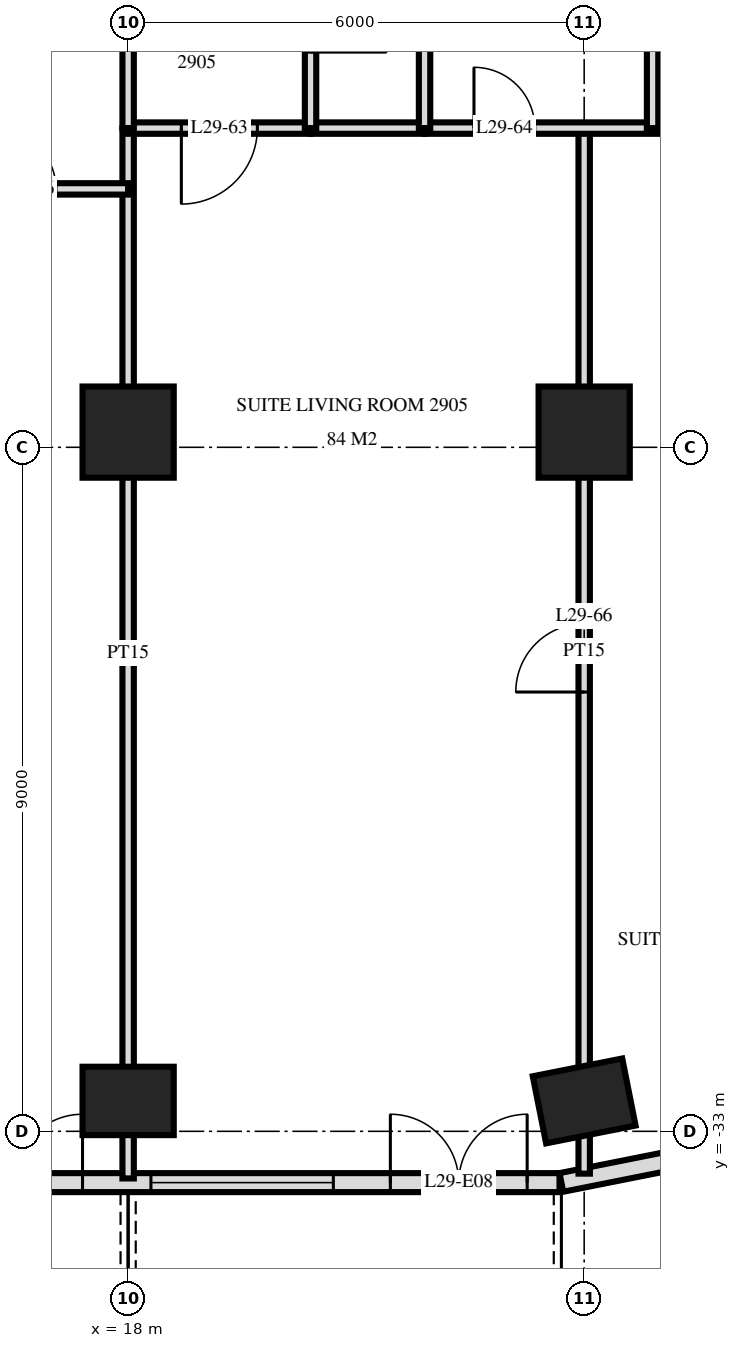
"""IFC4 building model, lengths in metres.
Left out: names, types, materials, properties, quantities, classifications, styles, units other than length and angle.
Written with IfcOpenShell. Run it as: python <this file> out.ifc"""

import sys

from ifc_helpers import new_model, si_unit, direction, frame, frame_2d, origin, origin_2d, place, context, subcontext, project, spatial, rectangle, extrude, element, fill, save


model = new_model("IFC4")
c1 = context("Model", 3, precision=1e-05, world=origin(), true_north=direction((0.0, 1.0)))
c2 = subcontext(c1, "Body", "Model", "MODEL_VIEW")
j1 = project(units=[si_unit("LENGTHUNIT", "METRE"), si_unit("PLANEANGLEUNIT", "RADIAN")], contexts=[c1])
p1 = place(None, origin())
s1 = spatial("IfcSite", under=j1, at=p1, CompositionType="ELEMENT")
p2 = place(p1, origin())
s2 = spatial("IfcBuilding", under=s1, at=p2, CompositionType="ELEMENT")
p3 = place(p2, frame((0.0, 0.0, 116.4)))
s3 = spatial("IfcBuildingStorey", under=s2, at=p3, CompositionType="ELEMENT", Elevation=116.4)
p4 = place(p3, frame((18.0, -32.6, 0.0), z_axis=(0.0, 0.0, 1.0), x_axis=(1.0, 0.0, 0.0)))
e1 = element("IfcColumn", 1, at=p4, inside=s3, PredefinedType="COLUMN", context=c2, shape_type="SweptSolid", body=[
    extrude(rectangle(XDim=1.2, YDim=0.9, at=origin_2d()), origin(), (0.0, 0.0, 1.0), 3.6),
])
p5 = place(p3, frame((18.0, -23.8, 0.0), z_axis=(0.0, 0.0, 1.0), x_axis=(1.0, 0.0, 0.0)))
e2 = element("IfcColumn", 2, at=p5, inside=s3, PredefinedType="COLUMN", context=c2, shape_type="SweptSolid", body=[
    extrude(rectangle(XDim=1.2, YDim=1.2, at=origin_2d()), origin(), (0.0, 0.0, 1.0), 3.6),
])
p6 = place(p3, frame((24.0, -32.6, 0.0), z_axis=(0.0, 0.0, 1.0), x_axis=(0.980792089743, 0.195056086032, 0.0)))
e3 = element("IfcColumn", 3, at=p6, inside=s3, PredefinedType="COLUMN", context=c2, shape_type="SweptSolid", body=[
    extrude(rectangle(XDim=1.2, YDim=0.9, at=origin_2d()), origin(), (0.0, 0.0, 1.0), 3.6),
])
p7 = place(p3, frame((24.0, -23.8, 0.0), z_axis=(0.0, 0.0, 1.0), x_axis=(1.0, 0.0, 0.0)))
e4 = element("IfcColumn", 4, at=p7, inside=s3, PredefinedType="COLUMN", context=c2, shape_type="SweptSolid", body=[
    extrude(rectangle(XDim=1.2, YDim=1.2, at=origin_2d()), origin(), (0.0, 0.0, 1.0), 3.6),
])
p8 = place(p3, frame((-23.675, -33.675, 0.0), z_axis=(0.0, 0.0, 1.0), x_axis=(1.0, 0.0, 0.0)))
e5 = element("IfcWall", 5, at=p8, inside=s3, PredefinedType="SOLIDWALL", context=c2, shape_type="SweptSolid", body=[
    extrude(rectangle(XDim=47.351, YDim=0.25, at=frame_2d((23.675, 0.0))), origin(), (0.0, 0.0, 1.0), 3.32),
])
p9 = place(p8, frame((0.275, 0.0, 0.3)))
e6 = element("IfcOpeningElement", 6, at=p9, cuts=e5, PredefinedType="OPENING", context=c2, shape_type="SweptSolid", body=[
    extrude(rectangle(XDim=2.4, YDim=2.1, at=frame_2d((1.2, 1.05))), frame((0.0, 0.135, 0.0), z_axis=(0.0, -1.0, 0.0), x_axis=(1.0, 0.0, 0.0)), (0.0, 0.0, 1.0), 0.27),
])
p10 = place(p8, frame((3.425, 0.0, 0.0)))
e7 = element("IfcOpeningElement", 7, at=p10, cuts=e5, PredefinedType="OPENING", context=c2, shape_type="SweptSolid", body=[
    extrude(rectangle(XDim=1.8, YDim=2.4, at=frame_2d((0.9, 1.2))), frame((0.0, 0.135, 0.0), z_axis=(0.0, -1.0, 0.0), x_axis=(1.0, 0.0, 0.0)), (0.0, 0.0, 1.0), 0.27),
])
p11 = place(p8, frame((5.975, 0.0, 0.3)))
e8 = element("IfcOpeningElement", 8, at=p11, cuts=e5, PredefinedType="OPENING", context=c2, shape_type="SweptSolid", body=[
    extrude(rectangle(XDim=2.4, YDim=2.1, at=frame_2d((1.2, 1.05))), frame((0.0, 0.135, 0.0), z_axis=(0.0, -1.0, 0.0), x_axis=(1.0, 0.0, 0.0)), (0.0, 0.0, 1.0), 0.27),
])
p12 = place(p8, frame((9.275, 0.0, 0.0)))
e9 = element("IfcOpeningElement", 9, at=p12, cuts=e5, PredefinedType="OPENING", context=c2, shape_type="SweptSolid", body=[
    extrude(rectangle(XDim=1.8, YDim=2.4, at=frame_2d((0.9, 1.2))), frame((0.0, 0.135, 0.0), z_axis=(0.0, -1.0, 0.0), x_axis=(1.0, 0.0, 0.0)), (0.0, 0.0, 1.0), 0.27),
])
p13 = place(p8, frame((12.275, 0.0, 0.0)))
e10 = element("IfcOpeningElement", 10, at=p13, cuts=e5, PredefinedType="OPENING", context=c2, shape_type="SweptSolid", body=[
    extrude(rectangle(XDim=1.8, YDim=2.4, at=frame_2d((0.9, 1.2))), frame((0.0, 0.135, 0.0), z_axis=(0.0, -1.0, 0.0), x_axis=(1.0, 0.0, 0.0)), (0.0, 0.0, 1.0), 0.27),
])
p14 = place(p8, frame((14.975, 0.0, 0.3)))
e11 = element("IfcOpeningElement", 11, at=p14, cuts=e5, PredefinedType="OPENING", context=c2, shape_type="SweptSolid", body=[
    extrude(rectangle(XDim=2.4, YDim=2.1, at=frame_2d((1.2, 1.05))), frame((0.0, 0.135, 0.0), z_axis=(0.0, -1.0, 0.0), x_axis=(1.0, 0.0, 0.0)), (0.0, 0.0, 1.0), 0.27),
])
p15 = place(p8, frame((17.975, 0.0, 0.3)))
e12 = element("IfcOpeningElement", 12, at=p15, cuts=e5, PredefinedType="OPENING", context=c2, shape_type="SweptSolid", body=[
    extrude(rectangle(XDim=2.4, YDim=2.1, at=frame_2d((1.2, 1.05))), frame((0.0, 0.135, 0.0), z_axis=(0.0, -1.0, 0.0), x_axis=(1.0, 0.0, 0.0)), (0.0, 0.0, 1.0), 0.27),
])
p16 = place(p8, frame((21.275, 0.0, 0.0)))
e13 = element("IfcOpeningElement", 13, at=p16, cuts=e5, PredefinedType="OPENING", context=c2, shape_type="SweptSolid", body=[
    extrude(rectangle(XDim=1.8, YDim=2.4, at=frame_2d((0.9, 1.2))), frame((0.0, 0.135, 0.0), z_axis=(0.0, -1.0, 0.0), x_axis=(1.0, 0.0, 0.0)), (0.0, 0.0, 1.0), 0.27),
])
p17 = place(p8, frame((24.275, 0.0, 0.0)))
e14 = element("IfcOpeningElement", 14, at=p17, cuts=e5, PredefinedType="OPENING", context=c2, shape_type="SweptSolid", body=[
    extrude(rectangle(XDim=1.8, YDim=2.4, at=frame_2d((0.9, 1.2))), frame((0.0, 0.135, 0.0), z_axis=(0.0, -1.0, 0.0), x_axis=(1.0, 0.0, 0.0)), (0.0, 0.0, 1.0), 0.27),
])
p18 = place(p8, frame((26.975, 0.0, 0.3)))
e15 = element("IfcOpeningElement", 15, at=p18, cuts=e5, PredefinedType="OPENING", context=c2, shape_type="SweptSolid", body=[
    extrude(rectangle(XDim=2.4, YDim=2.1, at=frame_2d((1.2, 1.05))), frame((0.0, 0.135, 0.0), z_axis=(0.0, -1.0, 0.0), x_axis=(1.0, 0.0, 0.0)), (0.0, 0.0, 1.0), 0.27),
])
p19 = place(p8, frame((30.275, 0.0, 0.0)))
e16 = element("IfcOpeningElement", 16, at=p19, cuts=e5, PredefinedType="OPENING", context=c2, shape_type="SweptSolid", body=[
    extrude(rectangle(XDim=1.8, YDim=2.4, at=frame_2d((0.9, 1.2))), frame((0.0, 0.135, 0.0), z_axis=(0.0, -1.0, 0.0), x_axis=(1.0, 0.0, 0.0)), (0.0, 0.0, 1.0), 0.27),
])
p20 = place(p8, frame((32.975, 0.0, 0.3)))
e17 = element("IfcOpeningElement", 17, at=p20, cuts=e5, PredefinedType="OPENING", context=c2, shape_type="SweptSolid", body=[
    extrude(rectangle(XDim=2.4, YDim=2.1, at=frame_2d((1.2, 1.05))), frame((0.0, 0.135, 0.0), z_axis=(0.0, -1.0, 0.0), x_axis=(1.0, 0.0, 0.0)), (0.0, 0.0, 1.0), 0.27),
])
p21 = place(p8, frame((35.975, 0.0, 0.3)))
e18 = element("IfcOpeningElement", 18, at=p21, cuts=e5, PredefinedType="OPENING", context=c2, shape_type="SweptSolid", body=[
    extrude(rectangle(XDim=2.4, YDim=2.1, at=frame_2d((1.2, 1.05))), frame((0.0, 0.135, 0.0), z_axis=(0.0, -1.0, 0.0), x_axis=(1.0, 0.0, 0.0)), (0.0, 0.0, 1.0), 0.27),
])
p22 = place(p8, frame((39.275, 0.0, 0.0)))
e19 = element("IfcOpeningElement", 19, at=p22, cuts=e5, PredefinedType="OPENING", context=c2, shape_type="SweptSolid", body=[
    extrude(rectangle(XDim=1.8, YDim=2.4, at=frame_2d((0.9, 1.2))), frame((0.0, 0.135, 0.0), z_axis=(0.0, -1.0, 0.0), x_axis=(1.0, 0.0, 0.0)), (0.0, 0.0, 1.0), 0.27),
])
p23 = place(p8, frame((41.975, 0.0, 0.3)))
e20 = element("IfcOpeningElement", 20, at=p23, cuts=e5, PredefinedType="OPENING", context=c2, shape_type="SweptSolid", body=[
    extrude(rectangle(XDim=2.4, YDim=2.1, at=frame_2d((1.2, 1.05))), frame((0.0, 0.135, 0.0), z_axis=(0.0, -1.0, 0.0), x_axis=(1.0, 0.0, 0.0)), (0.0, 0.0, 1.0), 0.27),
])
p24 = place(p8, frame((45.125, 0.0, 0.0)))
e21 = element("IfcOpeningElement", 21, at=p24, cuts=e5, PredefinedType="OPENING", context=c2, shape_type="SweptSolid", body=[
    extrude(rectangle(XDim=1.8, YDim=2.4, at=frame_2d((0.9, 1.2))), frame((0.0, 0.135, 0.0), z_axis=(0.0, -1.0, 0.0), x_axis=(1.0, 0.0, 0.0)), (0.0, 0.0, 1.0), 0.27),
])
p25 = place(p3, frame((23.7, -33.673, 0.0), z_axis=(0.0, 0.0, 1.0), x_axis=(0.980775640221, 0.19513878023, 0.0)))
e22 = element("IfcWall", 22, at=p25, inside=s3, PredefinedType="SOLIDWALL", context=c2, shape_type="SweptSolid", body=[
    extrude(rectangle(XDim=1.681, YDim=0.25, at=frame_2d((0.841, 0.0))), origin(), (0.0, 0.0, 1.0), 3.32),
])
p26 = place(p3, frame((24.9, -19.8, 0.0), z_axis=(0.0, 0.0, 1.0), x_axis=(0.0, 1.0, 0.0)))
e23 = element("IfcWall", 23, at=p26, inside=s3, PredefinedType="PARTITIONING", context=c2, shape_type="SweptSolid", body=[
    extrude(rectangle(XDim=3.0, YDim=0.15, at=frame_2d((1.5, 0.0))), origin(), (0.0, 0.0, 1.0), 3.32),
])
p27 = place(p3, frame((24.0, -33.557, 0.0), z_axis=(0.0, 0.0, 1.0), x_axis=(0.0, 1.0, 0.0)))
e24 = element("IfcWall", 24, at=p27, inside=s3, PredefinedType="PARTITIONING", context=c2, shape_type="SweptSolid", body=[
    extrude(rectangle(XDim=13.757, YDim=0.15, at=frame_2d((6.878, 0.0))), origin(), (0.0, 0.0, 1.0), 3.32),
])
p28 = place(p27, frame((6.337, 0.0, 0.0)))
e25 = element("IfcOpeningElement", 25, at=p28, cuts=e24, PredefinedType="OPENING", context=c2, shape_type="SweptSolid", body=[
    extrude(rectangle(XDim=0.9, YDim=2.1, at=frame_2d((0.45, 1.05))), frame((0.0, 0.085, 0.0), z_axis=(0.0, -1.0, 0.0), x_axis=(1.0, 0.0, 0.0)), (0.0, 0.0, 1.0), 0.17),
])
p29 = place(p3, frame((21.9, -19.8, 0.0), z_axis=(0.0, 0.0, 1.0), x_axis=(0.0, 1.0, 0.0)))
e26 = element("IfcWall", 26, at=p29, inside=s3, PredefinedType="PLUMBINGWALL", context=c2, shape_type="SweptSolid", body=[
    extrude(rectangle(XDim=3.0, YDim=0.15, at=frame_2d((1.5, 0.0))), origin(), (0.0, 0.0, 1.0), 3.32),
])
p30 = place(p3, frame((20.4, -19.8, 0.0), z_axis=(0.0, 0.0, 1.0), x_axis=(0.0, 1.0, 0.0)))
e27 = element("IfcWall", 27, at=p30, inside=s3, PredefinedType="PARTITIONING", context=c2, shape_type="SweptSolid", body=[
    extrude(rectangle(XDim=3.0, YDim=0.15, at=frame_2d((1.5, 0.0))), origin(), (0.0, 0.0, 1.0), 3.32),
])
p31 = place(p30, frame((1.0, 0.0, 0.0)))
e28 = element("IfcOpeningElement", 28, at=p31, cuts=e27, PredefinedType="OPENING", context=c2, shape_type="SweptSolid", body=[
    extrude(rectangle(XDim=1.0, YDim=2.1, at=frame_2d((0.5, 1.05))), frame((0.0, 0.085, 0.0), z_axis=(0.0, -1.0, 0.0), x_axis=(1.0, 0.0, 0.0)), (0.0, 0.0, 1.0), 0.17),
])
p32 = place(p3, frame((18.0, -19.8, 0.0), z_axis=(0.0, 0.0, 1.0), x_axis=(0.0, 1.0, 0.0)))
e29 = element("IfcWall", 29, at=p32, inside=s3, PredefinedType="PARTITIONING", context=c2, shape_type="SweptSolid", body=[
    extrude(rectangle(XDim=3.0, YDim=0.15, at=frame_2d((1.5, 0.0))), origin(), (0.0, 0.0, 1.0), 3.32),
])
p33 = place(p3, frame((18.0, -33.62, 0.0), z_axis=(0.0, 0.0, 1.0), x_axis=(0.0, 1.0, 0.0)))
e30 = element("IfcWall", 30, at=p33, inside=s3, PredefinedType="PARTITIONING", context=c2, shape_type="SweptSolid", body=[
    extrude(rectangle(XDim=13.82, YDim=0.15, at=frame_2d((6.91, 0.0))), origin(), (0.0, 0.0, 1.0), 3.32),
])
p34 = place(p3, frame((13.8, -20.6, 0.0), z_axis=(0.0, 0.0, 1.0), x_axis=(1.0, 0.0, 0.0)))
e31 = element("IfcWall", 31, at=p34, inside=s3, PredefinedType="PARTITIONING", context=c2, shape_type="SweptSolid", body=[
    extrude(rectangle(XDim=4.2, YDim=0.15, at=frame_2d((2.1, 0.0))), origin(), (0.0, 0.0, 1.0), 3.32),
])
p35 = place(p34, frame((2.45, 0.0, 0.0)))
e32 = element("IfcOpeningElement", 32, at=p35, cuts=e31, PredefinedType="OPENING", context=c2, shape_type="SweptSolid", body=[
    extrude(rectangle(XDim=0.8, YDim=2.1, at=frame_2d((0.4, 1.05))), frame((0.0, 0.085, 0.0), z_axis=(0.0, -1.0, 0.0), x_axis=(1.0, 0.0, 0.0)), (0.0, 0.0, 1.0), 0.17),
])
p36 = place(p3, frame((18.0, -19.8, 0.0), z_axis=(0.0, 0.0, 1.0), x_axis=(1.0, 0.0, 0.0)))
e33 = element("IfcWall", 33, at=p36, inside=s3, PredefinedType="PARTITIONING", context=c2, shape_type="SweptSolid", body=[
    extrude(rectangle(XDim=2.4, YDim=0.15, at=frame_2d((1.2, 0.0))), origin(), (0.0, 0.0, 1.0), 3.32),
])
p37 = place(p36, frame((0.7, 0.0, 0.0)))
e34 = element("IfcOpeningElement", 34, at=p37, cuts=e33, PredefinedType="OPENING", context=c2, shape_type="SweptSolid", body=[
    extrude(rectangle(XDim=1.0, YDim=2.1, at=frame_2d((0.5, 1.05))), frame((0.0, 0.085, 0.0), z_axis=(0.0, -1.0, 0.0), x_axis=(1.0, 0.0, 0.0)), (0.0, 0.0, 1.0), 0.17),
])
p38 = place(p3, frame((21.9, -19.8, 0.0), z_axis=(0.0, 0.0, 1.0), x_axis=(1.0, 0.0, 0.0)))
e35 = element("IfcWall", 35, at=p38, inside=s3, PredefinedType="PARTITIONING", context=c2, shape_type="SweptSolid", body=[
    extrude(rectangle(XDim=6.12, YDim=0.15, at=frame_2d((3.06, 0.0))), origin(), (0.0, 0.0, 1.0), 3.32),
])
p39 = place(p38, frame((0.65, 0.0, 0.0)))
e36 = element("IfcOpeningElement", 36, at=p39, cuts=e35, PredefinedType="OPENING", context=c2, shape_type="SweptSolid", body=[
    extrude(rectangle(XDim=0.8, YDim=2.1, at=frame_2d((0.4, 1.05))), frame((0.0, 0.085, 0.0), z_axis=(0.0, -1.0, 0.0), x_axis=(1.0, 0.0, 0.0)), (0.0, 0.0, 1.0), 0.17),
])
p40 = place(p38, frame((4.2, 0.0, 0.0)))
e37 = element("IfcOpeningElement", 37, at=p40, cuts=e35, PredefinedType="OPENING", context=c2, shape_type="SweptSolid", body=[
    extrude(rectangle(XDim=0.9, YDim=2.1, at=frame_2d((0.45, 1.05))), frame((0.0, 0.085, 0.0), z_axis=(0.0, -1.0, 0.0), x_axis=(1.0, 0.0, 0.0)), (0.0, 0.0, 1.0), 0.17),
])
p41 = place(p3, frame((20.4, -19.8, 0.0), z_axis=(0.0, 0.0, 1.0), x_axis=(1.0, 0.0, 0.0)))
e38 = element("IfcWall", 38, at=p41, inside=s3, PredefinedType="PLUMBINGWALL", context=c2, shape_type="SweptSolid", body=[
    extrude(rectangle(XDim=1.5, YDim=0.15, at=frame_2d((0.75, 0.0))), origin(), (0.0, 0.0, 1.0), 3.32),
])
p42 = place(p22, origin())
e39 = element("IfcDoor", 39, at=p42, inside=s3, OperationType="DOUBLE_DOOR_SINGLE_SWING", PredefinedType="DOOR", context=c2, shape_type="SweptSolid", body=[
    extrude(rectangle(XDim=1.8, YDim=2.4, at=frame_2d((0.9, 1.2))), frame((0.0, 0.025, 0.0), z_axis=(0.0, -1.0, 0.0), x_axis=(1.0, 0.0, 0.0)), (0.0, 0.0, 1.0), 0.05),
])
fill(e19, e39)
p43 = place(p23, origin())
e40 = element("IfcWindow", 40, at=p43, inside=s3, PartitioningType="SINGLE_PANEL", PredefinedType="WINDOW", context=c2, shape_type="SweptSolid", body=[
    extrude(rectangle(XDim=2.4, YDim=2.1, at=frame_2d((1.2, 1.05))), frame((0.0, 0.03, 0.0), z_axis=(0.0, -1.0, 0.0), x_axis=(1.0, 0.0, 0.0)), (0.0, 0.0, 1.0), 0.06),
])
fill(e20, e40)
p44 = place(p24, origin())
e41 = element("IfcDoor", 41, at=p44, inside=s3, OperationType="DOUBLE_DOOR_SINGLE_SWING", PredefinedType="DOOR", context=c2, shape_type="SweptSolid", body=[
    extrude(rectangle(XDim=1.8, YDim=2.4, at=frame_2d((0.9, 1.2))), frame((0.0, 0.025, 0.0), z_axis=(0.0, -1.0, 0.0), x_axis=(1.0, 0.0, 0.0)), (0.0, 0.0, 1.0), 0.05),
])
fill(e21, e41)
p45 = place(p35, origin())
e42 = element("IfcDoor", 42, at=p45, inside=s3, OperationType="SINGLE_SWING_RIGHT", PredefinedType="DOOR", context=c2, shape_type="SweptSolid", body=[
    extrude(rectangle(XDim=0.8, YDim=2.1, at=frame_2d((0.4, 1.05))), frame((0.0, 0.025, 0.0), z_axis=(0.0, -1.0, 0.0), x_axis=(1.0, 0.0, 0.0)), (0.0, 0.0, 1.0), 0.05),
])
fill(e32, e42)
p46 = place(p37, frame((0.5, 0.0, 0.0), z_axis=(0.0, 0.0, 1.0), x_axis=(-1.0, 0.0, 0.0)))
e43 = element("IfcDoor", 43, at=p46, inside=s3, OperationType="SINGLE_SWING_LEFT", PredefinedType="DOOR", context=c2, shape_type="SweptSolid", body=[
    extrude(rectangle(XDim=1.0, YDim=2.1, at=frame_2d((0.0, 1.05))), frame((0.0, -0.025, 0.0), z_axis=(0.0, 1.0, 0.0), x_axis=(-1.0, 0.0, 0.0)), (0.0, 0.0, 1.0), 0.05),
])
fill(e34, e43)
p47 = place(p39, origin())
e44 = element("IfcDoor", 44, at=p47, inside=s3, OperationType="SINGLE_SWING_RIGHT", PredefinedType="DOOR", context=c2, shape_type="SweptSolid", body=[
    extrude(rectangle(XDim=0.8, YDim=2.1, at=frame_2d((0.4, 1.05))), frame((0.0, 0.025, 0.0), z_axis=(0.0, -1.0, 0.0), x_axis=(1.0, 0.0, 0.0)), (0.0, 0.0, 1.0), 0.05),
])
fill(e36, e44)
p48 = place(p28, origin())
e45 = element("IfcDoor", 45, at=p48, inside=s3, OperationType="SINGLE_SWING_RIGHT", PredefinedType="DOOR", context=c2, shape_type="SweptSolid", body=[
    extrude(rectangle(XDim=0.9, YDim=2.1, at=frame_2d((0.45, 1.05))), frame((0.0, 0.025, 0.0), z_axis=(0.0, -1.0, 0.0), x_axis=(1.0, 0.0, 0.0)), (0.0, 0.0, 1.0), 0.05),
])
fill(e25, e45)
save(model, sys.argv[1])
